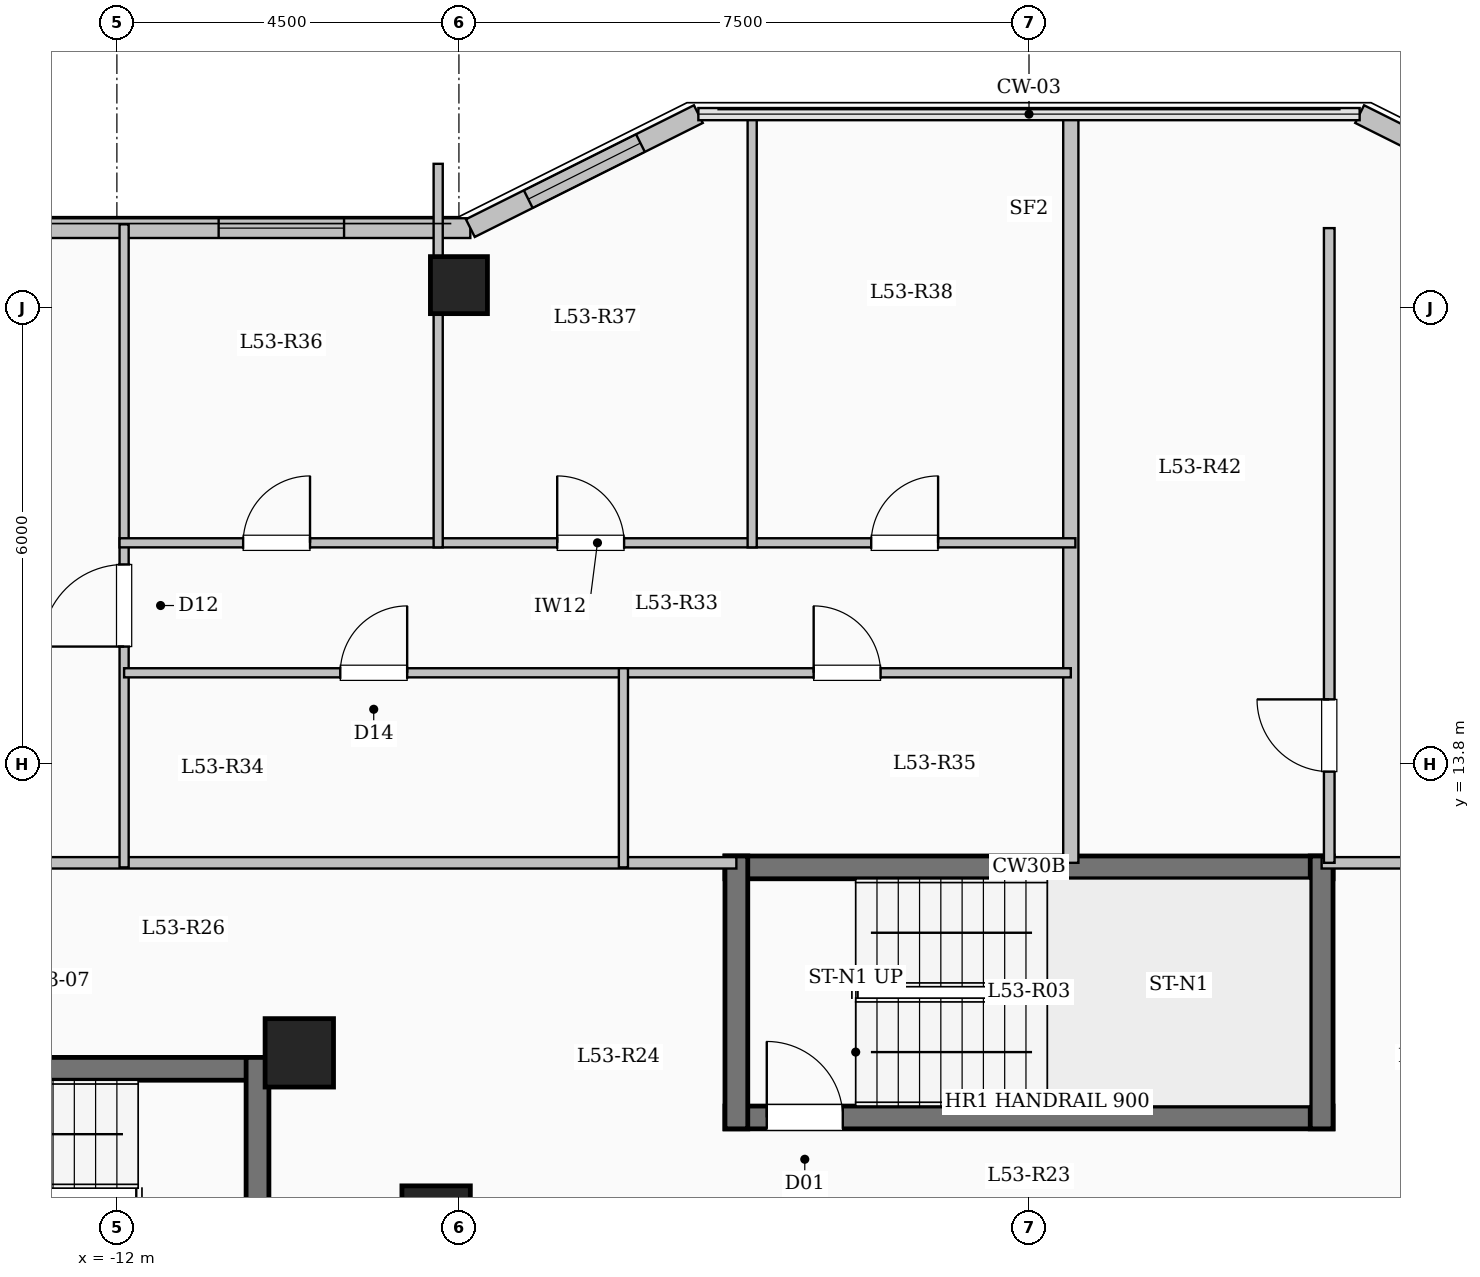
"""IFC4 building model, lengths in metres.
Left out: names, types, materials, properties, quantities, classifications, styles, units other than length and angle.
Written with IfcOpenShell. Run it as: python <this file> out.ifc"""

import sys

from ifc_helpers import new_model, si_unit, direction, frame, frame_2d, origin, origin_2d, place, context, subcontext, project, spatial, rectangle, extrude, element, fill, save


model = new_model("IFC4")
c1 = context("Model", 3, precision=1e-05, world=origin(), true_north=direction((0.0, 1.0)))
c2 = subcontext(c1, "Body", "Model", "MODEL_VIEW")
j1 = project(units=[si_unit("LENGTHUNIT", "METRE"), si_unit("PLANEANGLEUNIT", "RADIAN")], contexts=[c1])
p1 = place(None, origin())
s1 = spatial("IfcSite", under=j1, at=p1, CompositionType="ELEMENT")
p2 = place(p1, origin())
s2 = spatial("IfcBuilding", under=s1, at=p2, CompositionType="ELEMENT")
p3 = place(p2, frame((0.0, 0.0, 196.95)))
s3 = spatial("IfcBuildingStorey", under=s2, at=p3, CompositionType="ELEMENT", Elevation=196.95)
for number, where, z_axis, x_axis in (
    (1, (-7.8, 7.8, 0.0), (0.0, 0.0, 1.0), (1.0, 0.0, 0.0)),
    (2, (-9.6, 10.0, 0.0), (0.0, 0.0, 1.0), (1.0, 0.0, 0.0)),
):
    element("IfcColumn", number, at=place(p3, frame(where, z_axis=z_axis, x_axis=x_axis)), inside=s3, PredefinedType="COLUMN", context=c2, shape_type="SweptSolid", body=[
        extrude(rectangle(XDim=0.9, YDim=0.9, at=origin_2d()), origin(), (0.0, 0.0, 1.0), 3.35),
    ])
p4 = place(p3, frame((-7.5, 20.1, 0.0), z_axis=(0.0, 0.0, 1.0), x_axis=(1.0, 0.0, 0.0)))
e3 = element("IfcColumn", 3, at=p4, inside=s3, PredefinedType="COLUMN", context=c2, shape_type="SweptSolid", body=[
    extrude(rectangle(XDim=0.75, YDim=0.75, at=origin_2d()), origin(), (0.0, 0.0, 1.0), 3.35),
])
p5 = place(p3, frame((-18.45, 20.85, 0.0), z_axis=(0.0, 0.0, 1.0), x_axis=(1.0, 0.0, 0.0)))
e4 = element("IfcWall", 4, at=p5, inside=s3, PredefinedType="SOLIDWALL", context=c2, shape_type="SweptSolid", body=[
    extrude(rectangle(XDim=11.1, YDim=0.26, at=frame_2d((5.55, 0.0))), origin(), (0.0, 0.0, 1.0), 3.1),
])
p6 = place(p5, frame((2.215, 0.0, 0.9)))
e5 = element("IfcOpeningElement", 5, at=p6, cuts=e4, PredefinedType="OPENING", context=c2, shape_type="SweptSolid", body=[
    extrude(rectangle(XDim=2.2, YDim=1.75, at=frame_2d((1.1, 0.875))), frame((0.0, 0.14, 0.0), z_axis=(0.0, -1.0, 0.0), x_axis=(1.0, 0.0, 0.0)), (0.0, 0.0, 1.0), 0.28),
])
p7 = place(p5, frame((7.789, 0.0, 0.9)))
e6 = element("IfcOpeningElement", 6, at=p7, cuts=e4, PredefinedType="OPENING", context=c2, shape_type="SweptSolid", body=[
    extrude(rectangle(XDim=1.65, YDim=1.6, at=frame_2d((0.825, 0.8))), frame((0.0, 0.14, 0.0), z_axis=(0.0, -1.0, 0.0), x_axis=(1.0, 0.0, 0.0)), (0.0, 0.0, 1.0), 0.28),
])
p8 = place(p3, frame((-7.35, 20.85, 0.0), z_axis=(0.0, 0.0, 1.0), x_axis=(0.894427191, 0.4472135955, 0.0)))
e7 = element("IfcWall", 7, at=p8, inside=s3, PredefinedType="SOLIDWALL", context=c2, shape_type="SweptSolid", body=[
    extrude(rectangle(XDim=3.354, YDim=0.26, at=frame_2d((1.677, 0.0))), origin(), (0.0, 0.0, 1.0), 3.1),
])
p9 = place(p8, frame((0.852, 0.0, 0.9)))
e8 = element("IfcOpeningElement", 8, at=p9, cuts=e7, PredefinedType="OPENING", context=c2, shape_type="SweptSolid", body=[
    extrude(rectangle(XDim=1.65, YDim=1.6, at=frame_2d((0.825, 0.8))), frame((0.0, 0.14, 0.0), z_axis=(0.0, -1.0, 0.0), x_axis=(1.0, 0.0, 0.0)), (0.0, 0.0, 1.0), 0.28),
])
p10 = place(p3, frame((4.35, 22.35, 0.0), z_axis=(0.0, 0.0, 1.0), x_axis=(0.894427191, -0.4472135955, 0.0)))
e9 = element("IfcWall", 9, at=p10, inside=s3, PredefinedType="SOLIDWALL", context=c2, shape_type="SweptSolid", body=[
    extrude(rectangle(XDim=3.354, YDim=0.26, at=frame_2d((1.677, 0.0))), origin(), (0.0, 0.0, 1.0), 3.1),
])
p11 = place(p10, frame((1.653, 0.0, 0.95)))
e10 = element("IfcOpeningElement", 10, at=p11, cuts=e9, PredefinedType="OPENING", context=c2, shape_type="SweptSolid", body=[
    extrude(rectangle(XDim=1.2, YDim=1.5, at=frame_2d((0.6, 0.75))), frame((0.0, 0.14, 0.0), z_axis=(0.0, -1.0, 0.0), x_axis=(1.0, 0.0, 0.0)), (0.0, 0.0, 1.0), 0.28),
])
p12 = place(p3, frame((-18.0, 9.79, 0.0), z_axis=(0.0, 0.0, 1.0), x_axis=(1.0, 0.0, 0.0)))
e11 = element("IfcWall", 11, at=p12, inside=s3, PredefinedType="SHEAR", context=c2, shape_type="SweptSolid", body=[
    extrude(rectangle(XDim=8.0, YDim=0.3, at=frame_2d((4.0, 0.0))), origin(), (0.0, 0.0, 1.0), 3.35),
])
p13 = place(p3, frame((-10.15, 6.35, 0.0), z_axis=(0.0, 0.0, 1.0), x_axis=(0.0, 1.0, 0.0)))
e12 = element("IfcWall", 12, at=p13, inside=s3, PredefinedType="SHEAR", context=c2, shape_type="SweptSolid", body=[
    extrude(rectangle(XDim=3.59, YDim=0.3, at=frame_2d((1.795, 0.0))), origin(), (0.0, 0.0, 1.0), 3.35),
])
p14 = place(p3, frame((-4.0, 12.44, 0.0), z_axis=(0.0, 0.0, 1.0), x_axis=(1.0, 0.0, 0.0)))
e13 = element("IfcWall", 13, at=p14, inside=s3, PredefinedType="SHEAR", context=c2, shape_type="SweptSolid", body=[
    extrude(rectangle(XDim=8.0, YDim=0.3, at=frame_2d((4.0, 0.0))), origin(), (0.0, 0.0, 1.0), 3.35),
])
p15 = place(p3, frame((-4.0, 9.15, 0.0), z_axis=(0.0, 0.0, 1.0), x_axis=(1.0, 0.0, 0.0)))
e14 = element("IfcWall", 14, at=p15, inside=s3, PredefinedType="SHEAR", context=c2, shape_type="SweptSolid", body=[
    extrude(rectangle(XDim=8.0, YDim=0.3, at=frame_2d((4.0, 0.0))), origin(), (0.0, 0.0, 1.0), 3.35),
])
p16 = place(p15, frame((0.55, 0.0, 0.0)))
e15 = element("IfcOpeningElement", 15, at=p16, cuts=e14, PredefinedType="OPENING", context=c2, shape_type="SweptSolid", body=[
    extrude(rectangle(XDim=1.0, YDim=2.15, at=frame_2d((0.5, 1.075))), frame((0.0, 0.16, 0.0), z_axis=(0.0, -1.0, 0.0), x_axis=(1.0, 0.0, 0.0)), (0.0, 0.0, 1.0), 0.32),
])
for number, where, z_axis, x_axis in (
    (16, (-3.85, 9.0, 0.0), (0.0, 0.0, 1.0), (0.0, 1.0, 0.0)),
    (17, (3.85, 9.0, 0.0), (0.0, 0.0, 1.0), (0.0, 1.0, 0.0)),
):
    element("IfcWall", number, at=place(p3, frame(where, z_axis=z_axis, x_axis=x_axis)), inside=s3, PredefinedType="SHEAR", context=c2, shape_type="SweptSolid", body=[
        extrude(rectangle(XDim=3.59, YDim=0.3, at=frame_2d((1.795, 0.0))), origin(), (0.0, 0.0, 1.0), 3.35),
    ])
p17 = place(p3, frame((-18.35, 12.5, 0.0), z_axis=(0.0, 0.0, 1.0), x_axis=(1.0, 0.0, 0.0)))
e18 = element("IfcWall", 18, at=p17, inside=s3, PredefinedType="PARTITIONING", context=c2, shape_type="SweptSolid", body=[
    extrude(rectangle(XDim=14.5, YDim=0.15, at=frame_2d((7.25, 0.0))), origin(), (0.0, 0.0, 1.0), 3.1),
])
p18 = place(p17, frame((0.7, 0.0, 0.0)))
e19 = element("IfcOpeningElement", 19, at=p18, cuts=e18, PredefinedType="OPENING", context=c2, shape_type="SweptSolid", body=[
    extrude(rectangle(XDim=0.96, YDim=2.15, at=frame_2d((0.48, 1.075))), frame((0.0, 0.085, 0.0), z_axis=(0.0, -1.0, 0.0), x_axis=(1.0, 0.0, 0.0)), (0.0, 0.0, 1.0), 0.17),
])
p19 = place(p3, frame((3.85, 12.5, 0.0), z_axis=(0.0, 0.0, 1.0), x_axis=(1.0, 0.0, 0.0)))
e20 = element("IfcWall", 20, at=p19, inside=s3, PredefinedType="PARTITIONING", context=c2, shape_type="SweptSolid", body=[
    extrude(rectangle(XDim=14.5, YDim=0.15, at=frame_2d((7.25, 0.0))), origin(), (0.0, 0.0, 1.0), 3.1),
])
p20 = place(p19, frame((2.186, 0.0, 0.0)))
e21 = element("IfcOpeningElement", 21, at=p20, cuts=e20, PredefinedType="OPENING", context=c2, shape_type="SweptSolid", body=[
    extrude(rectangle(XDim=0.95, YDim=2.15, at=frame_2d((0.475, 1.075))), frame((0.0, 0.085, 0.0), z_axis=(0.0, -1.0, 0.0), x_axis=(1.0, 0.0, 0.0)), (0.0, 0.0, 1.0), 0.17),
])
p21 = place(p19, frame((7.379, 0.0, 0.0)))
e22 = element("IfcOpeningElement", 22, at=p21, cuts=e20, PredefinedType="OPENING", context=c2, shape_type="SweptSolid", body=[
    extrude(rectangle(XDim=0.95, YDim=2.15, at=frame_2d((0.475, 1.075))), frame((0.0, 0.085, 0.0), z_axis=(0.0, -1.0, 0.0), x_axis=(1.0, 0.0, 0.0)), (0.0, 0.0, 1.0), 0.17),
])
p22 = place(p19, frame((11.998, 0.0, 0.0)))
e23 = element("IfcOpeningElement", 23, at=p22, cuts=e20, PredefinedType="OPENING", context=c2, shape_type="SweptSolid", body=[
    extrude(rectangle(XDim=0.95, YDim=2.15, at=frame_2d((0.475, 1.075))), frame((0.0, 0.085, 0.0), z_axis=(0.0, -1.0, 0.0), x_axis=(1.0, 0.0, 0.0)), (0.0, 0.0, 1.0), 0.17),
])
p23 = place(p3, frame((0.55, 12.5, 0.0), z_axis=(0.0, 0.0, 1.0), x_axis=(0.0, 1.0, 0.0)))
e24 = element("IfcWall", 24, at=p23, inside=s3, PredefinedType="SOLIDWALL", context=c2, shape_type="SweptSolid", body=[
    extrude(rectangle(XDim=9.88, YDim=0.2, at=frame_2d((4.94, 0.0))), origin(), (0.0, 0.0, 1.0), 3.1),
])
p24 = place(p3, frame((-11.905, 12.44, 0.0), z_axis=(0.0, 0.0, 1.0), x_axis=(0.0, 1.0, 0.0)))
e25 = element("IfcWall", 25, at=p24, inside=s3, PredefinedType="PARTITIONING", context=c2, shape_type="SweptSolid", body=[
    extrude(rectangle(XDim=8.46, YDim=0.12, at=frame_2d((4.23, 0.0))), origin(), (0.0, 0.0, 1.0), 3.1),
])
p25 = place(p24, frame((2.905, 0.0, 0.0)))
e26 = element("IfcOpeningElement", 26, at=p25, cuts=e25, PredefinedType="OPENING", context=c2, shape_type="SweptSolid", body=[
    extrude(rectangle(XDim=1.08, YDim=2.15, at=frame_2d((0.54, 1.075))), frame((0.0, 0.07, 0.0), z_axis=(0.0, -1.0, 0.0), x_axis=(1.0, 0.0, 0.0)), (0.0, 0.0, 1.0), 0.14),
])
p26 = place(p3, frame((-11.905, 15.0, 0.0), z_axis=(0.0, 0.0, 1.0), x_axis=(1.0, 0.0, 0.0)))
e27 = element("IfcWall", 27, at=p26, inside=s3, PredefinedType="PARTITIONING", context=c2, shape_type="SweptSolid", body=[
    extrude(rectangle(XDim=6.569, YDim=0.12, at=frame_2d((3.285, 0.0))), origin(), (0.0, 0.0, 1.0), 3.1),
])
p27 = place(p26, frame((2.844, 0.0, 0.0)))
e28 = element("IfcOpeningElement", 28, at=p27, cuts=e27, PredefinedType="OPENING", context=c2, shape_type="SweptSolid", body=[
    extrude(rectangle(XDim=0.88, YDim=2.1, at=frame_2d((0.44, 1.05))), frame((0.0, 0.07, 0.0), z_axis=(0.0, -1.0, 0.0), x_axis=(1.0, 0.0, 0.0)), (0.0, 0.0, 1.0), 0.14),
])
p28 = place(p3, frame((-5.336, 15.0, 0.0), z_axis=(0.0, 0.0, 1.0), x_axis=(1.0, 0.0, 0.0)))
e29 = element("IfcWall", 29, at=p28, inside=s3, PredefinedType="PARTITIONING", context=c2, shape_type="SweptSolid", body=[
    extrude(rectangle(XDim=5.886, YDim=0.12, at=frame_2d((2.943, 0.0))), origin(), (0.0, 0.0, 1.0), 3.1),
])
p29 = place(p28, frame((2.503, 0.0, 0.0)))
e30 = element("IfcOpeningElement", 30, at=p29, cuts=e29, PredefinedType="OPENING", context=c2, shape_type="SweptSolid", body=[
    extrude(rectangle(XDim=0.88, YDim=2.1, at=frame_2d((0.44, 1.05))), frame((0.0, 0.07, 0.0), z_axis=(0.0, -1.0, 0.0), x_axis=(1.0, 0.0, 0.0)), (0.0, 0.0, 1.0), 0.14),
])
p30 = place(p3, frame((-11.965, 16.71, 0.0), z_axis=(0.0, 0.0, 1.0), x_axis=(1.0, 0.0, 0.0)))
e31 = element("IfcWall", 31, at=p30, inside=s3, PredefinedType="PARTITIONING", context=c2, shape_type="SweptSolid", body=[
    extrude(rectangle(XDim=12.575, YDim=0.12, at=frame_2d((6.288, 0.0))), origin(), (0.0, 0.0, 1.0), 2.725),
])
p31 = place(p30, frame((1.626, 0.0, 0.0)))
e32 = element("IfcOpeningElement", 32, at=p31, cuts=e31, PredefinedType="OPENING", context=c2, shape_type="SweptSolid", body=[
    extrude(rectangle(XDim=0.88, YDim=2.1, at=frame_2d((0.44, 1.05))), frame((0.0, 0.07, 0.0), z_axis=(0.0, -1.0, 0.0), x_axis=(1.0, 0.0, 0.0)), (0.0, 0.0, 1.0), 0.14),
])
p32 = place(p30, frame((5.758, 0.0, 0.0)))
e33 = element("IfcOpeningElement", 33, at=p32, cuts=e31, PredefinedType="OPENING", context=c2, shape_type="SweptSolid", body=[
    extrude(rectangle(XDim=0.88, YDim=2.1, at=frame_2d((0.44, 1.05))), frame((0.0, 0.07, 0.0), z_axis=(0.0, -1.0, 0.0), x_axis=(1.0, 0.0, 0.0)), (0.0, 0.0, 1.0), 0.14),
])
p33 = place(p30, frame((9.889, 0.0, 0.0)))
e34 = element("IfcOpeningElement", 34, at=p33, cuts=e31, PredefinedType="OPENING", context=c2, shape_type="SweptSolid", body=[
    extrude(rectangle(XDim=0.88, YDim=2.1, at=frame_2d((0.44, 1.05))), frame((0.0, 0.07, 0.0), z_axis=(0.0, -1.0, 0.0), x_axis=(1.0, 0.0, 0.0)), (0.0, 0.0, 1.0), 0.14),
])
p34 = place(p3, frame((-5.336, 12.44, 0.0), z_axis=(0.0, 0.0, 1.0), x_axis=(0.0, 1.0, 0.0)))
e35 = element("IfcWall", 35, at=p34, inside=s3, PredefinedType="PARTITIONING", context=c2, shape_type="SweptSolid", body=[
    extrude(rectangle(XDim=2.62, YDim=0.12, at=frame_2d((1.31, 0.0))), origin(), (0.0, 0.0, 1.0), 3.1),
])
p35 = place(p3, frame((-7.773, 16.65, 0.0), z_axis=(0.0, 0.0, 1.0), x_axis=(0.0, 1.0, 0.0)))
e36 = element("IfcWall", 36, at=p35, inside=s3, PredefinedType="PARTITIONING", context=c2, shape_type="SweptSolid", body=[
    extrude(rectangle(XDim=5.046, YDim=0.12, at=frame_2d((2.523, 0.0))), origin(), (0.0, 0.0, 1.0), 2.585),
])
p36 = place(p3, frame((-3.642, 16.65, 0.0), z_axis=(0.0, 0.0, 1.0), x_axis=(0.0, 1.0, 0.0)))
e37 = element("IfcWall", 37, at=p36, inside=s3, PredefinedType="PARTITIONING", context=c2, shape_type="SweptSolid", body=[
    extrude(rectangle(XDim=5.73, YDim=0.12, at=frame_2d((2.865, 0.0))), origin(), (0.0, 0.0, 1.0), 3.1),
])
p37 = place(p3, frame((3.95, 12.5, 0.0), z_axis=(0.0, 0.0, 1.0), x_axis=(0.0, 1.0, 0.0)))
e38 = element("IfcWall", 38, at=p37, inside=s3, PredefinedType="PARTITIONING", context=c2, shape_type="SweptSolid", body=[
    extrude(rectangle(XDim=8.35, YDim=0.14, at=frame_2d((4.175, 0.0))), origin(), (0.0, 0.0, 1.0), 3.1),
])
p38 = place(p37, frame((1.2, 0.0, 0.0)))
e39 = element("IfcOpeningElement", 39, at=p38, cuts=e38, PredefinedType="OPENING", context=c2, shape_type="SweptSolid", body=[
    extrude(rectangle(XDim=0.95, YDim=2.15, at=frame_2d((0.475, 1.075))), frame((0.0, 0.08, 0.0), z_axis=(0.0, -1.0, 0.0), x_axis=(1.0, 0.0, 0.0)), (0.0, 0.0, 1.0), 0.16),
])
p39 = place(p7, origin())
e40 = element("IfcWindow", 40, at=p39, inside=s3, PartitioningType="SINGLE_PANEL", PredefinedType="WINDOW", context=c2, shape_type="SweptSolid", body=[
    extrude(rectangle(XDim=1.65, YDim=1.6, at=frame_2d((0.825, 0.8))), frame((0.0, 0.03, 0.0), z_axis=(0.0, -1.0, 0.0), x_axis=(1.0, 0.0, 0.0)), (0.0, 0.0, 1.0), 0.06),
])
fill(e6, e40)
p40 = place(p9, origin())
e41 = element("IfcWindow", 41, at=p40, inside=s3, PartitioningType="SINGLE_PANEL", PredefinedType="WINDOW", context=c2, shape_type="SweptSolid", body=[
    extrude(rectangle(XDim=1.65, YDim=1.6, at=frame_2d((0.825, 0.8))), frame((0.0, 0.03, 0.0), z_axis=(0.0, -1.0, 0.0), x_axis=(1.0, 0.0, 0.0)), (0.0, 0.0, 1.0), 0.06),
])
fill(e8, e41)
p41 = place(p16, origin())
e42 = element("IfcDoor", 42, at=p41, inside=s3, OperationType="SINGLE_SWING_LEFT", PredefinedType="DOOR", context=c2, shape_type="SweptSolid", body=[
    extrude(rectangle(XDim=1.0, YDim=2.15, at=frame_2d((0.5, 1.075))), frame((0.0, 0.025, 0.0), z_axis=(0.0, -1.0, 0.0), x_axis=(1.0, 0.0, 0.0)), (0.0, 0.0, 1.0), 0.05),
])
fill(e15, e42)
p42 = place(p25, origin())
e43 = element("IfcDoor", 43, at=p42, inside=s3, OperationType="SINGLE_SWING_LEFT", PredefinedType="DOOR", context=c2, shape_type="SweptSolid", body=[
    extrude(rectangle(XDim=1.08, YDim=2.15, at=frame_2d((0.54, 1.075))), frame((0.0, 0.025, 0.0), z_axis=(0.0, -1.0, 0.0), x_axis=(1.0, 0.0, 0.0)), (0.0, 0.0, 1.0), 0.05),
])
fill(e26, e43)
p43 = place(p27, origin())
e44 = element("IfcDoor", 44, at=p43, inside=s3, OperationType="SINGLE_SWING_RIGHT", PredefinedType="DOOR", context=c2, shape_type="SweptSolid", body=[
    extrude(rectangle(XDim=0.88, YDim=2.1, at=frame_2d((0.44, 1.05))), frame((0.0, 0.025, 0.0), z_axis=(0.0, -1.0, 0.0), x_axis=(1.0, 0.0, 0.0)), (0.0, 0.0, 1.0), 0.05),
])
fill(e28, e44)
p44 = place(p29, origin())
e45 = element("IfcDoor", 45, at=p44, inside=s3, OperationType="SINGLE_SWING_LEFT", PredefinedType="DOOR", context=c2, shape_type="SweptSolid", body=[
    extrude(rectangle(XDim=0.88, YDim=2.1, at=frame_2d((0.44, 1.05))), frame((0.0, 0.025, 0.0), z_axis=(0.0, -1.0, 0.0), x_axis=(1.0, 0.0, 0.0)), (0.0, 0.0, 1.0), 0.05),
])
fill(e30, e45)
p45 = place(p31, origin())
e46 = element("IfcDoor", 46, at=p45, inside=s3, OperationType="SINGLE_SWING_RIGHT", PredefinedType="DOOR", context=c2, shape_type="SweptSolid", body=[
    extrude(rectangle(XDim=0.88, YDim=2.1, at=frame_2d((0.44, 1.05))), frame((0.0, 0.025, 0.0), z_axis=(0.0, -1.0, 0.0), x_axis=(1.0, 0.0, 0.0)), (0.0, 0.0, 1.0), 0.05),
])
fill(e32, e46)
p46 = place(p32, origin())
e47 = element("IfcDoor", 47, at=p46, inside=s3, OperationType="SINGLE_SWING_LEFT", PredefinedType="DOOR", context=c2, shape_type="SweptSolid", body=[
    extrude(rectangle(XDim=0.88, YDim=2.1, at=frame_2d((0.44, 1.05))), frame((0.0, 0.025, 0.0), z_axis=(0.0, -1.0, 0.0), x_axis=(1.0, 0.0, 0.0)), (0.0, 0.0, 1.0), 0.05),
])
fill(e33, e47)
p47 = place(p33, origin())
e48 = element("IfcDoor", 48, at=p47, inside=s3, OperationType="SINGLE_SWING_RIGHT", PredefinedType="DOOR", context=c2, shape_type="SweptSolid", body=[
    extrude(rectangle(XDim=0.88, YDim=2.1, at=frame_2d((0.44, 1.05))), frame((0.0, 0.025, 0.0), z_axis=(0.0, -1.0, 0.0), x_axis=(1.0, 0.0, 0.0)), (0.0, 0.0, 1.0), 0.05),
])
fill(e34, e48)
p48 = place(p38, origin())
e49 = element("IfcDoor", 49, at=p48, inside=s3, OperationType="SINGLE_SWING_RIGHT", PredefinedType="DOOR", context=c2, shape_type="SweptSolid", body=[
    extrude(rectangle(XDim=0.95, YDim=2.15, at=frame_2d((0.475, 1.075))), frame((0.0, 0.025, 0.0), z_axis=(0.0, -1.0, 0.0), x_axis=(1.0, 0.0, 0.0)), (0.0, 0.0, 1.0), 0.05),
])
fill(e39, e49)
save(model, sys.argv[1])
